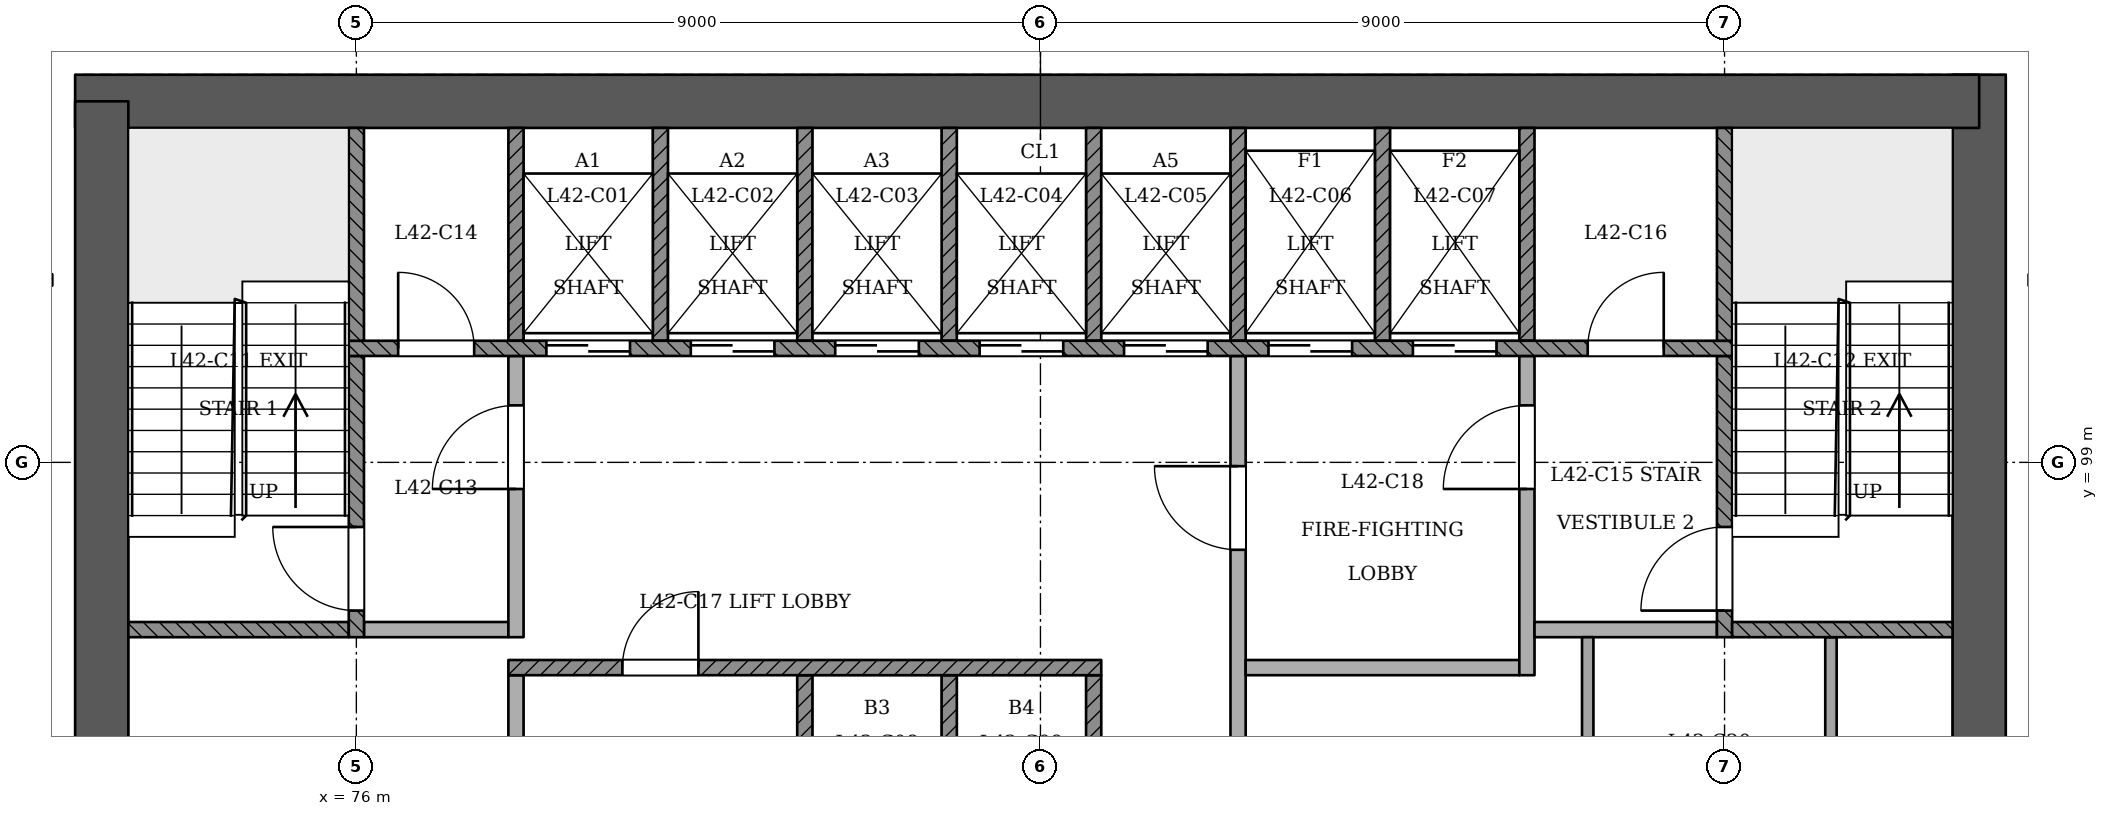
"""IFC4 building model, lengths in metres.
Left out: names, types, materials, properties, quantities, classifications, styles, units other than length and angle.
Written with IfcOpenShell. Run it as: python <this file> out.ifc"""

import sys

from ifc_helpers import new_model, si_unit, direction, frame, frame_2d, origin, place, context, subcontext, project, spatial, rectangle, extrude, element, fill, save


model = new_model("IFC4")
c1 = context("Model", 3, precision=1e-05, world=origin(), true_north=direction((0.0, 1.0)))
c2 = subcontext(c1, "Body", "Model", "MODEL_VIEW")
j1 = project(units=[si_unit("LENGTHUNIT", "METRE"), si_unit("PLANEANGLEUNIT", "RADIAN")], contexts=[c1])
p1 = place(None, origin())
s1 = spatial("IfcSite", under=j1, at=p1, CompositionType="ELEMENT")
p2 = place(p1, origin())
s2 = spatial("IfcBuilding", under=s1, at=p2, CompositionType="ELEMENT")
p3 = place(p2, frame((0.0, 0.0, 163.8)))
s3 = spatial("IfcBuildingStorey", under=s2, at=p3, CompositionType="ELEMENT", Elevation=163.8)
p4 = place(p3, frame((97.35, 93.05, 0.0), z_axis=(0.0, 0.0, 1.0), x_axis=(0.0, 1.0, 0.0)))
e1 = element("IfcWall", 1, at=p4, inside=s3, PredefinedType="SHEAR", context=c2, shape_type="SweptSolid", body=[
    extrude(rectangle(XDim=11.05, YDim=0.7, at=frame_2d((5.525, 0.0))), origin(), (0.0, 0.0, 1.0), 3.6),
])
p5 = place(p3, frame((97.35, 103.75, 0.0), z_axis=(0.0, 0.0, 1.0), x_axis=(-1.0, 0.0, 0.0)))
e2 = element("IfcWall", 2, at=p5, inside=s3, PredefinedType="SHEAR", context=c2, shape_type="SweptSolid", body=[
    extrude(rectangle(XDim=25.05, YDim=0.7, at=frame_2d((12.525, 0.0))), origin(), (0.0, 0.0, 1.0), 3.6),
])
p6 = place(p3, frame((72.65, 103.75, 0.0), z_axis=(0.0, 0.0, 1.0), x_axis=(0.0, -1.0, 0.0)))
e3 = element("IfcWall", 3, at=p6, inside=s3, PredefinedType="SHEAR", context=c2, shape_type="SweptSolid", body=[
    extrude(rectangle(XDim=11.05, YDim=0.7, at=frame_2d((5.525, 0.0))), origin(), (0.0, 0.0, 1.0), 3.6),
])
p7 = place(p3, frame((78.1, 93.4, 0.0), z_axis=(0.0, 0.0, 1.0), x_axis=(0.0, 1.0, 0.0)))
e4 = element("IfcWall", 4, at=p7, inside=s3, PredefinedType="PARTITIONING", context=c2, shape_type="SweptSolid", body=[
    extrude(rectangle(XDim=2.8, YDim=0.2, at=frame_2d((1.4, 0.0))), origin(), (0.0, 0.0, 1.0), 3.15),
])
for number, where, z_axis, x_axis in (
    (5, (81.9, 93.4, 0.0), (0.0, 0.0, 1.0), (0.0, 1.0, 0.0)),
    (6, (83.8, 93.4, 0.0), (0.0, 0.0, 1.0), (0.0, 1.0, 0.0)),
    (7, (85.7, 93.4, 0.0), (0.0, 0.0, 1.0), (0.0, 1.0, 0.0)),
):
    element("IfcWall", number, at=place(p3, frame(where, z_axis=z_axis, x_axis=x_axis)), inside=s3, PredefinedType="SOLIDWALL", context=c2, shape_type="SweptSolid", body=[
        extrude(rectangle(XDim=2.8, YDim=0.2, at=frame_2d((1.4, 0.0))), origin(), (0.0, 0.0, 1.0), 3.15),
    ])
p8 = place(p3, frame((87.6, 93.4, 0.0), z_axis=(0.0, 0.0, 1.0), x_axis=(0.0, 1.0, 0.0)))
e8 = element("IfcWall", 8, at=p8, inside=s3, PredefinedType="PARTITIONING", context=c2, shape_type="SweptSolid", body=[
    extrude(rectangle(XDim=7.0, YDim=0.2, at=frame_2d((3.5, 0.0))), origin(), (0.0, 0.0, 1.0), 3.15),
])
p9 = place(p8, frame((4.45, 0.0, 0.0)))
e9 = element("IfcOpeningElement", 9, at=p9, cuts=e8, PredefinedType="OPENING", context=c2, shape_type="SweptSolid", body=[
    extrude(rectangle(XDim=1.1, YDim=2.1, at=frame_2d((0.55, 1.05))), frame((0.0, 0.11, 0.0), z_axis=(0.0, -1.0, 0.0), x_axis=(1.0, 0.0, 0.0)), (0.0, 0.0, 1.0), 0.221),
])
for number, where, z_axis, x_axis in (
    (10, (92.2, 93.4, 0.0), (0.0, 0.0, 1.0), (0.0, 1.0, 0.0)),
    (11, (95.4, 93.4, 0.0), (0.0, 0.0, 1.0), (0.0, 1.0, 0.0)),
):
    element("IfcWall", number, at=place(p3, frame(where, z_axis=z_axis, x_axis=x_axis)), inside=s3, PredefinedType="PARTITIONING", context=c2, shape_type="SweptSolid", body=[
        extrude(rectangle(XDim=3.3, YDim=0.15, at=frame_2d((1.65, 0.0))), origin(), (0.0, 0.0, 1.0), 3.15),
    ])
p10 = place(p3, frame((78.0, 96.3, 0.0), z_axis=(0.0, 0.0, 1.0), x_axis=(1.0, 0.0, 0.0)))
e12 = element("IfcWall", 12, at=p10, inside=s3, PredefinedType="SOLIDWALL", context=c2, shape_type="SweptSolid", body=[
    extrude(rectangle(XDim=7.8, YDim=0.2, at=frame_2d((3.9, 0.0))), origin(), (0.0, 0.0, 1.0), 3.15),
])
p11 = place(p10, frame((1.5, 0.0, 0.0)))
e13 = element("IfcOpeningElement", 13, at=p11, cuts=e12, PredefinedType="OPENING", context=c2, shape_type="SweptSolid", body=[
    extrude(rectangle(XDim=1.0, YDim=2.1, at=frame_2d((0.5, 1.05))), frame((0.0, 0.11, 0.0), z_axis=(0.0, -1.0, 0.0), x_axis=(1.0, 0.0, 0.0)), (0.0, 0.0, 1.0), 0.221),
])
p12 = place(p3, frame((87.7, 96.3, 0.0), z_axis=(0.0, 0.0, 1.0), x_axis=(1.0, 0.0, 0.0)))
e14 = element("IfcWall", 14, at=p12, inside=s3, PredefinedType="PARTITIONING", context=c2, shape_type="SweptSolid", body=[
    extrude(rectangle(XDim=3.6, YDim=0.2, at=frame_2d((1.8, 0.0))), origin(), (0.0, 0.0, 1.0), 3.15),
])
p13 = place(p3, frame((91.4, 96.2, 0.0), z_axis=(0.0, 0.0, 1.0), x_axis=(0.0, 1.0, 0.0)))
e15 = element("IfcWall", 15, at=p13, inside=s3, PredefinedType="PARTITIONING", context=c2, shape_type="SweptSolid", body=[
    extrude(rectangle(XDim=4.2, YDim=0.2, at=frame_2d((2.1, 0.0))), origin(), (0.0, 0.0, 1.0), 3.15),
])
p14 = place(p13, frame((2.45, 0.0, 0.0)))
e16 = element("IfcOpeningElement", 16, at=p14, cuts=e15, PredefinedType="OPENING", context=c2, shape_type="SweptSolid", body=[
    extrude(rectangle(XDim=1.1, YDim=2.1, at=frame_2d((0.55, 1.05))), frame((0.0, 0.11, 0.0), z_axis=(0.0, -1.0, 0.0), x_axis=(1.0, 0.0, 0.0)), (0.0, 0.0, 1.0), 0.221),
])
p15 = place(p3, frame((73.0, 96.8, 0.0), z_axis=(0.0, 0.0, 1.0), x_axis=(1.0, 0.0, 0.0)))
e17 = element("IfcWall", 17, at=p15, inside=s3, PredefinedType="SOLIDWALL", context=c2, shape_type="SweptSolid", body=[
    extrude(rectangle(XDim=2.9, YDim=0.2, at=frame_2d((1.45, 0.0))), origin(), (0.0, 0.0, 1.0), 3.15),
])
p16 = place(p3, frame((76.0, 96.7, 0.0), z_axis=(0.0, 0.0, 1.0), x_axis=(0.0, 1.0, 0.0)))
e18 = element("IfcWall", 18, at=p16, inside=s3, PredefinedType="SOLIDWALL", context=c2, shape_type="SweptSolid", body=[
    extrude(rectangle(XDim=3.7, YDim=0.2, at=frame_2d((1.85, 0.0))), origin(), (0.0, 0.0, 1.0), 3.15),
])
p17 = place(p16, frame((0.35, 0.0, 0.0)))
e19 = element("IfcOpeningElement", 19, at=p17, cuts=e18, PredefinedType="OPENING", context=c2, shape_type="SweptSolid", body=[
    extrude(rectangle(XDim=1.1, YDim=2.1, at=frame_2d((0.55, 1.05))), frame((0.0, 0.11, 0.0), z_axis=(0.0, -1.0, 0.0), x_axis=(1.0, 0.0, 0.0)), (0.0, 0.0, 1.0), 0.221),
])
p18 = place(p3, frame((76.1, 96.8, 0.0), z_axis=(0.0, 0.0, 1.0), x_axis=(1.0, 0.0, 0.0)))
e20 = element("IfcWall", 20, at=p18, inside=s3, PredefinedType="PARTITIONING", context=c2, shape_type="SweptSolid", body=[
    extrude(rectangle(XDim=1.9, YDim=0.2, at=frame_2d((0.95, 0.0))), origin(), (0.0, 0.0, 1.0), 3.15),
])
p19 = place(p3, frame((78.1, 96.7, 0.0), z_axis=(0.0, 0.0, 1.0), x_axis=(0.0, 1.0, 0.0)))
e21 = element("IfcWall", 21, at=p19, inside=s3, PredefinedType="PARTITIONING", context=c2, shape_type="SweptSolid", body=[
    extrude(rectangle(XDim=3.7, YDim=0.2, at=frame_2d((1.85, 0.0))), origin(), (0.0, 0.0, 1.0), 3.15),
])
p20 = place(p19, frame((1.95, 0.0, 0.0)))
e22 = element("IfcOpeningElement", 22, at=p20, cuts=e21, PredefinedType="OPENING", context=c2, shape_type="SweptSolid", body=[
    extrude(rectangle(XDim=1.1, YDim=2.1, at=frame_2d((0.55, 1.05))), frame((0.0, 0.11, 0.0), z_axis=(0.0, -1.0, 0.0), x_axis=(1.0, 0.0, 0.0)), (0.0, 0.0, 1.0), 0.221),
])
p21 = place(p3, frame((91.5, 96.8, 0.0), z_axis=(0.0, 0.0, 1.0), x_axis=(1.0, 0.0, 0.0)))
e23 = element("IfcWall", 23, at=p21, inside=s3, PredefinedType="PARTITIONING", context=c2, shape_type="SweptSolid", body=[
    extrude(rectangle(XDim=2.4, YDim=0.2, at=frame_2d((1.2, 0.0))), origin(), (0.0, 0.0, 1.0), 3.15),
])
p22 = place(p3, frame((94.0, 96.7, 0.0), z_axis=(0.0, 0.0, 1.0), x_axis=(0.0, 1.0, 0.0)))
e24 = element("IfcWall", 24, at=p22, inside=s3, PredefinedType="SOLIDWALL", context=c2, shape_type="SweptSolid", body=[
    extrude(rectangle(XDim=3.7, YDim=0.2, at=frame_2d((1.85, 0.0))), origin(), (0.0, 0.0, 1.0), 3.15),
])
p23 = place(p22, frame((0.35, 0.0, 0.0)))
e25 = element("IfcOpeningElement", 25, at=p23, cuts=e24, PredefinedType="OPENING", context=c2, shape_type="SweptSolid", body=[
    extrude(rectangle(XDim=1.1, YDim=2.1, at=frame_2d((0.55, 1.05))), frame((0.0, 0.11, 0.0), z_axis=(0.0, -1.0, 0.0), x_axis=(1.0, 0.0, 0.0)), (0.0, 0.0, 1.0), 0.221),
])
p24 = place(p3, frame((94.1, 96.8, 0.0), z_axis=(0.0, 0.0, 1.0), x_axis=(1.0, 0.0, 0.0)))
e26 = element("IfcWall", 26, at=p24, inside=s3, PredefinedType="SOLIDWALL", context=c2, shape_type="SweptSolid", body=[
    extrude(rectangle(XDim=2.9, YDim=0.2, at=frame_2d((1.45, 0.0))), origin(), (0.0, 0.0, 1.0), 3.15),
])
p25 = place(p3, frame((75.9, 100.5, 0.0), z_axis=(0.0, 0.0, 1.0), x_axis=(1.0, 0.0, 0.0)))
e27 = element("IfcWall", 27, at=p25, inside=s3, PredefinedType="SOLIDWALL", context=c2, shape_type="SweptSolid", body=[
    extrude(rectangle(XDim=18.2, YDim=0.2, at=frame_2d((9.1, 0.0))), origin(), (0.0, 0.0, 1.0), 3.15),
])
p26 = place(p25, frame((2.6, 0.0, 0.0)))
e28 = element("IfcOpeningElement", 28, at=p26, cuts=e27, PredefinedType="OPENING", context=c2, shape_type="SweptSolid", body=[
    extrude(rectangle(XDim=1.1, YDim=2.1, at=frame_2d((0.55, 1.05))), frame((0.0, 0.11, 0.0), z_axis=(0.0, -1.0, 0.0), x_axis=(1.0, 0.0, 0.0)), (0.0, 0.0, 1.0), 0.221),
])
p27 = place(p25, frame((4.5, 0.0, 0.0)))
e29 = element("IfcOpeningElement", 29, at=p27, cuts=e27, PredefinedType="OPENING", context=c2, shape_type="SweptSolid", body=[
    extrude(rectangle(XDim=1.1, YDim=2.1, at=frame_2d((0.55, 1.05))), frame((0.0, 0.11, 0.0), z_axis=(0.0, -1.0, 0.0), x_axis=(1.0, 0.0, 0.0)), (0.0, 0.0, 1.0), 0.221),
])
p28 = place(p25, frame((6.4, 0.0, 0.0)))
e30 = element("IfcOpeningElement", 30, at=p28, cuts=e27, PredefinedType="OPENING", context=c2, shape_type="SweptSolid", body=[
    extrude(rectangle(XDim=1.1, YDim=2.1, at=frame_2d((0.55, 1.05))), frame((0.0, 0.11, 0.0), z_axis=(0.0, -1.0, 0.0), x_axis=(1.0, 0.0, 0.0)), (0.0, 0.0, 1.0), 0.221),
])
p29 = place(p25, frame((8.3, 0.0, 0.0)))
e31 = element("IfcOpeningElement", 31, at=p29, cuts=e27, PredefinedType="OPENING", context=c2, shape_type="SweptSolid", body=[
    extrude(rectangle(XDim=1.1, YDim=2.1, at=frame_2d((0.55, 1.05))), frame((0.0, 0.11, 0.0), z_axis=(0.0, -1.0, 0.0), x_axis=(1.0, 0.0, 0.0)), (0.0, 0.0, 1.0), 0.221),
])
p30 = place(p25, frame((10.2, 0.0, 0.0)))
e32 = element("IfcOpeningElement", 32, at=p30, cuts=e27, PredefinedType="OPENING", context=c2, shape_type="SweptSolid", body=[
    extrude(rectangle(XDim=1.1, YDim=2.1, at=frame_2d((0.55, 1.05))), frame((0.0, 0.11, 0.0), z_axis=(0.0, -1.0, 0.0), x_axis=(1.0, 0.0, 0.0)), (0.0, 0.0, 1.0), 0.221),
])
p31 = place(p25, frame((12.1, 0.0, 0.0)))
e33 = element("IfcOpeningElement", 33, at=p31, cuts=e27, PredefinedType="OPENING", context=c2, shape_type="SweptSolid", body=[
    extrude(rectangle(XDim=1.1, YDim=2.1, at=frame_2d((0.55, 1.05))), frame((0.0, 0.11, 0.0), z_axis=(0.0, -1.0, 0.0), x_axis=(1.0, 0.0, 0.0)), (0.0, 0.0, 1.0), 0.221),
])
p32 = place(p25, frame((14.0, 0.0, 0.0)))
e34 = element("IfcOpeningElement", 34, at=p32, cuts=e27, PredefinedType="OPENING", context=c2, shape_type="SweptSolid", body=[
    extrude(rectangle(XDim=1.1, YDim=2.1, at=frame_2d((0.55, 1.05))), frame((0.0, 0.11, 0.0), z_axis=(0.0, -1.0, 0.0), x_axis=(1.0, 0.0, 0.0)), (0.0, 0.0, 1.0), 0.221),
])
p33 = place(p25, frame((0.65, 0.0, 0.0)))
e35 = element("IfcOpeningElement", 35, at=p33, cuts=e27, PredefinedType="OPENING", context=c2, shape_type="SweptSolid", body=[
    extrude(rectangle(XDim=1.0, YDim=2.1, at=frame_2d((0.5, 1.05))), frame((0.0, 0.11, 0.0), z_axis=(0.0, -1.0, 0.0), x_axis=(1.0, 0.0, 0.0)), (0.0, 0.0, 1.0), 0.221),
])
p34 = place(p25, frame((16.3, 0.0, 0.0)))
e36 = element("IfcOpeningElement", 36, at=p34, cuts=e27, PredefinedType="OPENING", context=c2, shape_type="SweptSolid", body=[
    extrude(rectangle(XDim=1.0, YDim=2.1, at=frame_2d((0.5, 1.05))), frame((0.0, 0.11, 0.0), z_axis=(0.0, -1.0, 0.0), x_axis=(1.0, 0.0, 0.0)), (0.0, 0.0, 1.0), 0.221),
])
for number, where, z_axis, x_axis in (
    (37, (76.0, 100.6, 0.0), (0.0, 0.0, 1.0), (0.0, 1.0, 0.0)),
    (38, (78.1, 100.6, 0.0), (0.0, 0.0, 1.0), (0.0, 1.0, 0.0)),
    (39, (80.0, 100.6, 0.0), (0.0, 0.0, 1.0), (0.0, 1.0, 0.0)),
    (40, (81.9, 100.6, 0.0), (0.0, 0.0, 1.0), (0.0, 1.0, 0.0)),
    (41, (83.8, 100.6, 0.0), (0.0, 0.0, 1.0), (0.0, 1.0, 0.0)),
    (42, (85.7, 100.6, 0.0), (0.0, 0.0, 1.0), (0.0, 1.0, 0.0)),
    (43, (87.6, 100.6, 0.0), (0.0, 0.0, 1.0), (0.0, 1.0, 0.0)),
    (44, (89.5, 100.6, 0.0), (0.0, 0.0, 1.0), (0.0, 1.0, 0.0)),
    (45, (91.4, 100.6, 0.0), (0.0, 0.0, 1.0), (0.0, 1.0, 0.0)),
    (46, (94.0, 100.6, 0.0), (0.0, 0.0, 1.0), (0.0, 1.0, 0.0)),
):
    element("IfcWall", number, at=place(p3, frame(where, z_axis=z_axis, x_axis=x_axis)), inside=s3, PredefinedType="SOLIDWALL", context=c2, shape_type="SweptSolid", body=[
        extrude(rectangle(XDim=2.8, YDim=0.2, at=frame_2d((1.4, 0.0))), origin(), (0.0, 0.0, 1.0), 3.15),
    ])
p35 = place(p26, origin())
e47 = element("IfcDoor", 47, at=p35, inside=s3, OperationType="SLIDING_TO_RIGHT", PredefinedType="NOTDEFINED", context=c2, shape_type="SweptSolid", body=[
    extrude(rectangle(XDim=1.1, YDim=2.1, at=frame_2d((0.55, 1.05))), frame((0.0, 0.025, 0.0), z_axis=(0.0, -1.0, 0.0), x_axis=(1.0, 0.0, 0.0)), (0.0, 0.0, 1.0), 0.05),
])
fill(e28, e47)
p36 = place(p27, origin())
e48 = element("IfcDoor", 48, at=p36, inside=s3, OperationType="SLIDING_TO_LEFT", PredefinedType="NOTDEFINED", context=c2, shape_type="SweptSolid", body=[
    extrude(rectangle(XDim=1.1, YDim=2.1, at=frame_2d((0.55, 1.05))), frame((0.0, 0.025, 0.0), z_axis=(0.0, -1.0, 0.0), x_axis=(1.0, 0.0, 0.0)), (0.0, 0.0, 1.0), 0.05),
])
fill(e29, e48)
p37 = place(p28, origin())
e49 = element("IfcDoor", 49, at=p37, inside=s3, OperationType="SLIDING_TO_RIGHT", PredefinedType="NOTDEFINED", context=c2, shape_type="SweptSolid", body=[
    extrude(rectangle(XDim=1.1, YDim=2.1, at=frame_2d((0.55, 1.05))), frame((0.0, 0.025, 0.0), z_axis=(0.0, -1.0, 0.0), x_axis=(1.0, 0.0, 0.0)), (0.0, 0.0, 1.0), 0.05),
])
fill(e30, e49)
p38 = place(p29, origin())
e50 = element("IfcDoor", 50, at=p38, inside=s3, OperationType="SLIDING_TO_LEFT", PredefinedType="NOTDEFINED", context=c2, shape_type="SweptSolid", body=[
    extrude(rectangle(XDim=1.1, YDim=2.1, at=frame_2d((0.55, 1.05))), frame((0.0, 0.025, 0.0), z_axis=(0.0, -1.0, 0.0), x_axis=(1.0, 0.0, 0.0)), (0.0, 0.0, 1.0), 0.05),
])
fill(e31, e50)
p39 = place(p30, origin())
e51 = element("IfcDoor", 51, at=p39, inside=s3, OperationType="SLIDING_TO_RIGHT", PredefinedType="NOTDEFINED", context=c2, shape_type="SweptSolid", body=[
    extrude(rectangle(XDim=1.1, YDim=2.1, at=frame_2d((0.55, 1.05))), frame((0.0, 0.025, 0.0), z_axis=(0.0, -1.0, 0.0), x_axis=(1.0, 0.0, 0.0)), (0.0, 0.0, 1.0), 0.05),
])
fill(e32, e51)
p40 = place(p31, origin())
e52 = element("IfcDoor", 52, at=p40, inside=s3, OperationType="SLIDING_TO_RIGHT", PredefinedType="NOTDEFINED", context=c2, shape_type="SweptSolid", body=[
    extrude(rectangle(XDim=1.1, YDim=2.1, at=frame_2d((0.55, 1.05))), frame((0.0, 0.025, 0.0), z_axis=(0.0, -1.0, 0.0), x_axis=(1.0, 0.0, 0.0)), (0.0, 0.0, 1.0), 0.05),
])
fill(e33, e52)
p41 = place(p32, origin())
e53 = element("IfcDoor", 53, at=p41, inside=s3, OperationType="SLIDING_TO_LEFT", PredefinedType="NOTDEFINED", context=c2, shape_type="SweptSolid", body=[
    extrude(rectangle(XDim=1.1, YDim=2.1, at=frame_2d((0.55, 1.05))), frame((0.0, 0.025, 0.0), z_axis=(0.0, -1.0, 0.0), x_axis=(1.0, 0.0, 0.0)), (0.0, 0.0, 1.0), 0.05),
])
fill(e34, e53)
p42 = place(p17, origin())
e54 = element("IfcDoor", 54, at=p42, inside=s3, OperationType="SINGLE_SWING_RIGHT", PredefinedType="NOTDEFINED", context=c2, shape_type="SweptSolid", body=[
    extrude(rectangle(XDim=1.1, YDim=2.1, at=frame_2d((0.55, 1.05))), frame((0.0, 0.025, 0.0), z_axis=(0.0, -1.0, 0.0), x_axis=(1.0, 0.0, 0.0)), (0.0, 0.0, 1.0), 0.05),
])
fill(e19, e54)
p43 = place(p23, origin())
e55 = element("IfcDoor", 55, at=p43, inside=s3, OperationType="SINGLE_SWING_LEFT", PredefinedType="NOTDEFINED", context=c2, shape_type="SweptSolid", body=[
    extrude(rectangle(XDim=1.1, YDim=2.1, at=frame_2d((0.55, 1.05))), frame((0.0, 0.025, 0.0), z_axis=(0.0, -1.0, 0.0), x_axis=(1.0, 0.0, 0.0)), (0.0, 0.0, 1.0), 0.05),
])
fill(e25, e55)
p44 = place(p20, origin())
e56 = element("IfcDoor", 56, at=p44, inside=s3, OperationType="SINGLE_SWING_LEFT", PredefinedType="NOTDEFINED", context=c2, shape_type="SweptSolid", body=[
    extrude(rectangle(XDim=1.1, YDim=2.1, at=frame_2d((0.55, 1.05))), frame((0.0, 0.025, 0.0), z_axis=(0.0, -1.0, 0.0), x_axis=(1.0, 0.0, 0.0)), (0.0, 0.0, 1.0), 0.05),
])
fill(e22, e56)
p45 = place(p9, origin())
e57 = element("IfcDoor", 57, at=p45, inside=s3, OperationType="SINGLE_SWING_RIGHT", PredefinedType="NOTDEFINED", context=c2, shape_type="SweptSolid", body=[
    extrude(rectangle(XDim=1.1, YDim=2.1, at=frame_2d((0.55, 1.05))), frame((0.0, 0.025, 0.0), z_axis=(0.0, -1.0, 0.0), x_axis=(1.0, 0.0, 0.0)), (0.0, 0.0, 1.0), 0.05),
])
fill(e9, e57)
p46 = place(p14, origin())
e58 = element("IfcDoor", 58, at=p46, inside=s3, OperationType="SINGLE_SWING_LEFT", PredefinedType="NOTDEFINED", context=c2, shape_type="SweptSolid", body=[
    extrude(rectangle(XDim=1.1, YDim=2.1, at=frame_2d((0.55, 1.05))), frame((0.0, 0.025, 0.0), z_axis=(0.0, -1.0, 0.0), x_axis=(1.0, 0.0, 0.0)), (0.0, 0.0, 1.0), 0.05),
])
fill(e16, e58)
p47 = place(p33, origin())
e59 = element("IfcDoor", 59, at=p47, inside=s3, OperationType="SINGLE_SWING_LEFT", PredefinedType="NOTDEFINED", context=c2, shape_type="SweptSolid", body=[
    extrude(rectangle(XDim=1.0, YDim=2.1, at=frame_2d((0.5, 1.05))), frame((0.0, 0.025, 0.0), z_axis=(0.0, -1.0, 0.0), x_axis=(1.0, 0.0, 0.0)), (0.0, 0.0, 1.0), 0.05),
])
fill(e35, e59)
p48 = place(p34, origin())
e60 = element("IfcDoor", 60, at=p48, inside=s3, OperationType="SINGLE_SWING_RIGHT", PredefinedType="NOTDEFINED", context=c2, shape_type="SweptSolid", body=[
    extrude(rectangle(XDim=1.0, YDim=2.1, at=frame_2d((0.5, 1.05))), frame((0.0, 0.025, 0.0), z_axis=(0.0, -1.0, 0.0), x_axis=(1.0, 0.0, 0.0)), (0.0, 0.0, 1.0), 0.05),
])
fill(e36, e60)
p49 = place(p11, origin())
e61 = element("IfcDoor", 61, at=p49, inside=s3, OperationType="SINGLE_SWING_RIGHT", PredefinedType="NOTDEFINED", context=c2, shape_type="SweptSolid", body=[
    extrude(rectangle(XDim=1.0, YDim=2.1, at=frame_2d((0.5, 1.05))), frame((0.0, 0.025, 0.0), z_axis=(0.0, -1.0, 0.0), x_axis=(1.0, 0.0, 0.0)), (0.0, 0.0, 1.0), 0.05),
])
fill(e13, e61)
save(model, sys.argv[1])
